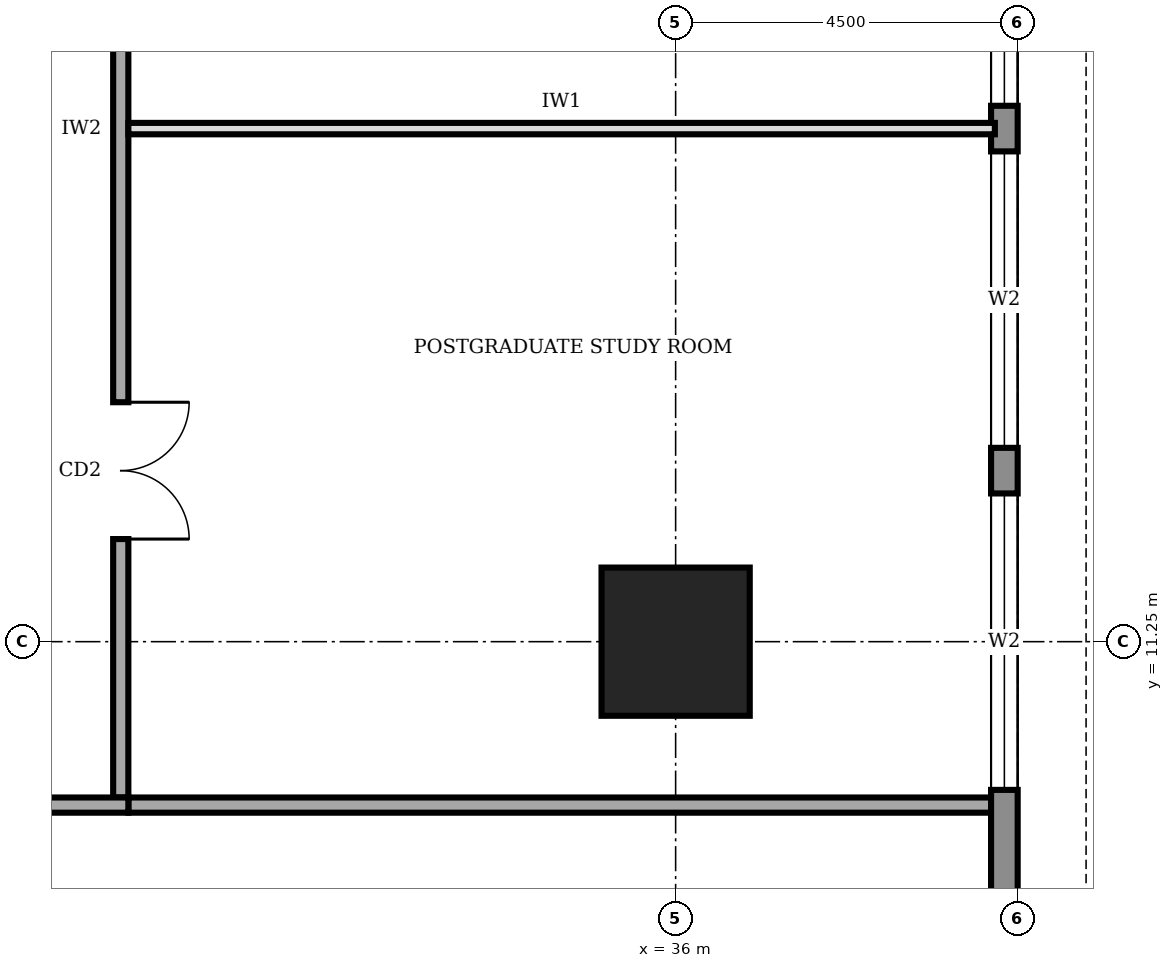
"""IFC4 building model, lengths in metres.
Left out: names, types, materials, properties, quantities, classifications, styles, units other than length and angle.
Written with IfcOpenShell. Run it as: python <this file> out.ifc"""

import sys

from ifc_helpers import new_model, si_unit, direction, frame, frame_2d, origin, origin_2d, place, context, subcontext, project, spatial, rectangle, extrude, element, fill, save


model = new_model("IFC4")
c1 = context("Model", 3, precision=1e-05, world=origin(), true_north=direction((0.0, 1.0)))
c2 = subcontext(c1, "Body", "Model", "MODEL_VIEW")
j1 = project(units=[si_unit("LENGTHUNIT", "METRE"), si_unit("PLANEANGLEUNIT", "RADIAN")], contexts=[c1])
p1 = place(None, origin())
s1 = spatial("IfcSite", under=j1, at=p1, CompositionType="ELEMENT")
p2 = place(p1, origin())
s2 = spatial("IfcBuilding", under=s1, at=p2, CompositionType="ELEMENT")
p3 = place(p2, frame((0.0, 0.0, 233.0)))
s3 = spatial("IfcBuildingStorey", under=s2, at=p3, CompositionType="ELEMENT", Elevation=233.0)
p4 = place(p3, frame((36.0, 11.25, 0.0), z_axis=(0.0, 0.0, 1.0), x_axis=(1.0, 0.0, 0.0)))
e1 = element("IfcColumn", 1, at=p4, inside=s3, PredefinedType="COLUMN", context=c2, shape_type="SweptSolid", body=[
    extrude(rectangle(XDim=1.95, YDim=1.95, at=origin_2d()), origin(), (0.0, 0.0, 1.0), 4.0),
])
p5 = place(p3, frame((40.325, 4.52, 0.0), z_axis=(0.0, 0.0, 1.0), x_axis=(0.0, 1.0, 0.0)))
e2 = element("IfcWall", 2, at=p5, inside=s3, PredefinedType="STANDARD", context=c2, shape_type="SweptSolid", body=[
    extrude(rectangle(XDim=31.46, YDim=0.35, at=frame_2d((15.73, 0.0))), origin(), (0.0, 0.0, 1.0), 3.75),
])
p6 = place(p5, frame((4.78, 0.0, 0.6)))
e3 = element("IfcOpeningElement", 3, at=p6, cuts=e2, PredefinedType="OPENING", context=c2, shape_type="SweptSolid", body=[
    extrude(rectangle(XDim=3.9, YDim=2.6, at=frame_2d((1.95, 1.3))), frame((0.0, 0.185, 0.0), z_axis=(0.0, -1.0, 0.0), x_axis=(1.0, 0.0, 0.0)), (0.0, 0.0, 1.0), 0.37),
])
p7 = place(p5, frame((9.28, 0.0, 0.6)))
e4 = element("IfcOpeningElement", 4, at=p7, cuts=e2, PredefinedType="OPENING", context=c2, shape_type="SweptSolid", body=[
    extrude(rectangle(XDim=3.9, YDim=2.6, at=frame_2d((1.95, 1.3))), frame((0.0, 0.185, 0.0), z_axis=(0.0, -1.0, 0.0), x_axis=(1.0, 0.0, 0.0)), (0.0, 0.0, 1.0), 0.37),
])
p8 = place(p5, frame((13.78, 0.0, 0.6)))
e5 = element("IfcOpeningElement", 5, at=p8, cuts=e2, PredefinedType="OPENING", context=c2, shape_type="SweptSolid", body=[
    extrude(rectangle(XDim=3.9, YDim=2.6, at=frame_2d((1.95, 1.3))), frame((0.0, 0.185, 0.0), z_axis=(0.0, -1.0, 0.0), x_axis=(1.0, 0.0, 0.0)), (0.0, 0.0, 1.0), 0.37),
])
p9 = place(p5, frame((18.28, 0.0, 0.6)))
e6 = element("IfcOpeningElement", 6, at=p9, cuts=e2, PredefinedType="OPENING", context=c2, shape_type="SweptSolid", body=[
    extrude(rectangle(XDim=3.9, YDim=2.6, at=frame_2d((1.95, 1.3))), frame((0.0, 0.185, 0.0), z_axis=(0.0, -1.0, 0.0), x_axis=(1.0, 0.0, 0.0)), (0.0, 0.0, 1.0), 0.37),
])
p10 = place(p5, frame((22.78, 0.0, 0.6)))
e7 = element("IfcOpeningElement", 7, at=p10, cuts=e2, PredefinedType="OPENING", context=c2, shape_type="SweptSolid", body=[
    extrude(rectangle(XDim=3.9, YDim=2.6, at=frame_2d((1.95, 1.3))), frame((0.0, 0.185, 0.0), z_axis=(0.0, -1.0, 0.0), x_axis=(1.0, 0.0, 0.0)), (0.0, 0.0, 1.0), 0.37),
])
p11 = place(p5, frame((27.21, 0.0, 0.6)))
e8 = element("IfcOpeningElement", 8, at=p11, cuts=e2, PredefinedType="OPENING", context=c2, shape_type="SweptSolid", body=[
    extrude(rectangle(XDim=3.9, YDim=2.6, at=frame_2d((1.95, 1.3))), frame((0.0, 0.185, 0.0), z_axis=(0.0, -1.0, 0.0), x_axis=(1.0, 0.0, 0.0)), (0.0, 0.0, 1.0), 0.37),
])
p12 = place(p3, frame((11.9, 9.1, 0.0), z_axis=(0.0, 0.0, 1.0), x_axis=(1.0, 0.0, 0.0)))
e9 = element("IfcWall", 9, at=p12, inside=s3, PredefinedType="SOLIDWALL", context=c2, shape_type="SweptSolid", body=[
    extrude(rectangle(XDim=16.9, YDim=0.2, at=frame_2d((8.45, 0.0))), origin(), (0.0, 0.0, 1.0), 3.75),
])
p13 = place(p3, frame((28.7, 9.2, 0.0), z_axis=(0.0, 0.0, 1.0), x_axis=(0.0, 1.0, 0.0)))
e10 = element("IfcWall", 10, at=p13, inside=s3, PredefinedType="SOLIDWALL", context=c2, shape_type="SweptSolid", body=[
    extrude(rectangle(XDim=23.05, YDim=0.2, at=frame_2d((11.525, 0.0))), origin(), (0.0, 0.0, 1.0), 3.75),
])
p14 = place(p13, frame((3.4, 0.0, 0.0)))
e11 = element("IfcOpeningElement", 11, at=p14, cuts=e10, PredefinedType="OPENING", context=c2, shape_type="SweptSolid", body=[
    extrude(rectangle(XDim=1.8, YDim=2.1, at=frame_2d((0.9, 1.05))), frame((0.0, 0.11, 0.0), z_axis=(0.0, -1.0, 0.0), x_axis=(1.0, 0.0, 0.0)), (0.0, 0.0, 1.0), 0.22),
])
p15 = place(p13, frame((12.4, 0.0, 0.0)))
e12 = element("IfcOpeningElement", 12, at=p15, cuts=e10, PredefinedType="OPENING", context=c2, shape_type="SweptSolid", body=[
    extrude(rectangle(XDim=1.8, YDim=2.1, at=frame_2d((0.9, 1.05))), frame((0.0, 0.11, 0.0), z_axis=(0.0, -1.0, 0.0), x_axis=(1.0, 0.0, 0.0)), (0.0, 0.0, 1.0), 0.22),
])
p16 = place(p13, frame((19.925, 0.0, 0.0)))
e13 = element("IfcOpeningElement", 13, at=p16, cuts=e10, PredefinedType="OPENING", context=c2, shape_type="SweptSolid", body=[
    extrude(rectangle(XDim=1.0, YDim=2.1, at=frame_2d((0.5, 1.05))), frame((0.0, 0.11, 0.0), z_axis=(0.0, -1.0, 0.0), x_axis=(1.0, 0.0, 0.0)), (0.0, 0.0, 1.0), 0.22),
])
p17 = place(p3, frame((28.8, 9.1, 0.0), z_axis=(0.0, 0.0, 1.0), x_axis=(1.0, 0.0, 0.0)))
e14 = element("IfcWall", 14, at=p17, inside=s3, PredefinedType="SOLIDWALL", context=c2, shape_type="SweptSolid", body=[
    extrude(rectangle(XDim=11.4, YDim=0.2, at=frame_2d((5.7, 0.0))), origin(), (0.0, 0.0, 1.0), 3.75),
])
p18 = place(p3, frame((28.8, 18.0, 0.0), z_axis=(0.0, 0.0, 1.0), x_axis=(1.0, 0.0, 0.0)))
e15 = element("IfcWall", 15, at=p18, inside=s3, PredefinedType="PARTITIONING", context=c2, shape_type="SweptSolid", body=[
    extrude(rectangle(XDim=11.4, YDim=0.15, at=frame_2d((5.7, 0.0))), origin(), (0.0, 0.0, 1.0), 3.75),
])
p19 = place(p6, origin())
e16 = element("IfcWindow", 16, at=p19, inside=s3, PartitioningType="SINGLE_PANEL", PredefinedType="WINDOW", context=c2, shape_type="SweptSolid", body=[
    extrude(rectangle(XDim=3.9, YDim=2.6, at=frame_2d((1.95, 1.3))), frame((0.0, 0.03, 0.0), z_axis=(0.0, -1.0, 0.0), x_axis=(1.0, 0.0, 0.0)), (0.0, 0.0, 1.0), 0.06),
])
fill(e3, e16)
p20 = place(p7, origin())
e17 = element("IfcWindow", 17, at=p20, inside=s3, PartitioningType="SINGLE_PANEL", PredefinedType="WINDOW", context=c2, shape_type="SweptSolid", body=[
    extrude(rectangle(XDim=3.9, YDim=2.6, at=frame_2d((1.95, 1.3))), frame((0.0, 0.03, 0.0), z_axis=(0.0, -1.0, 0.0), x_axis=(1.0, 0.0, 0.0)), (0.0, 0.0, 1.0), 0.06),
])
fill(e4, e17)
p21 = place(p8, origin())
e18 = element("IfcWindow", 18, at=p21, inside=s3, PartitioningType="SINGLE_PANEL", PredefinedType="WINDOW", context=c2, shape_type="SweptSolid", body=[
    extrude(rectangle(XDim=3.9, YDim=2.6, at=frame_2d((1.95, 1.3))), frame((0.0, 0.03, 0.0), z_axis=(0.0, -1.0, 0.0), x_axis=(1.0, 0.0, 0.0)), (0.0, 0.0, 1.0), 0.06),
])
fill(e5, e18)
p22 = place(p14, frame((1.8, 0.0, 0.0), z_axis=(0.0, 0.0, 1.0), x_axis=(-1.0, 0.0, 0.0)))
e19 = element("IfcDoor", 19, at=p22, inside=s3, OperationType="DOUBLE_DOOR_SINGLE_SWING", PredefinedType="DOOR", context=c2, shape_type="SweptSolid", body=[
    extrude(rectangle(XDim=1.8, YDim=2.1, at=frame_2d((0.9, 1.05))), frame((0.0, 0.025, 0.0), z_axis=(0.0, -1.0, 0.0), x_axis=(1.0, 0.0, 0.0)), (0.0, 0.0, 1.0), 0.05),
])
fill(e11, e19)
save(model, sys.argv[1])
